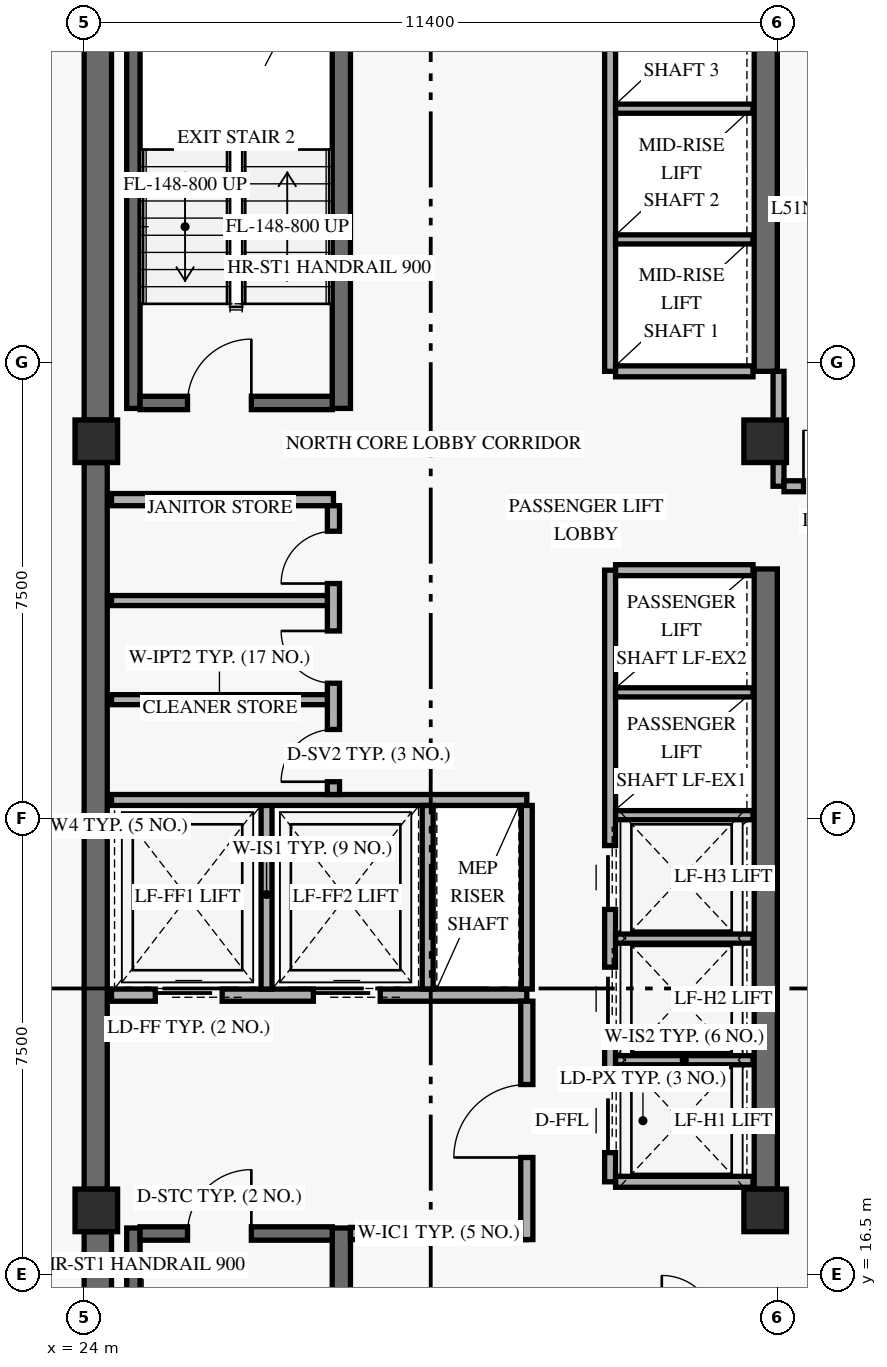
"""IFC4 building model, lengths in metres.
Left out: names, types, materials, properties, quantities, classifications, styles, units other than length and angle.
Written with IfcOpenShell. Run it as: python <this file> out.ifc"""

import sys

from ifc_helpers import new_model, si_unit, direction, frame, frame_2d, origin, origin_2d, place, context, subcontext, project, spatial, rectangle, extrude, element, fill, save


model = new_model("IFC4")
c1 = context("Model", 3, precision=1e-05, world=origin(), true_north=direction((0.0, 1.0)))
c2 = subcontext(c1, "Body", "Model", "MODEL_VIEW")
j1 = project(units=[si_unit("LENGTHUNIT", "METRE"), si_unit("PLANEANGLEUNIT", "RADIAN")], contexts=[c1])
p1 = place(None, origin())
s1 = spatial("IfcSite", under=j1, at=p1, CompositionType="ELEMENT")
p2 = place(p1, origin())
s2 = spatial("IfcBuilding", under=s1, at=p2, CompositionType="ELEMENT")
p3 = place(p2, frame((0.0, 0.0, 196.2)))
s3 = spatial("IfcBuildingStorey", under=s2, at=p3, CompositionType="ELEMENT", Elevation=196.2)
p4 = place(p3, frame((24.225, 9.6, 0.0), z_axis=(0.0, 0.0, 1.0), x_axis=(0.0, 1.0, 0.0)))
e1 = element("IfcWall", 1, at=p4, inside=s3, PredefinedType="SHEAR", context=c2, shape_type="SweptSolid", body=[
    extrude(rectangle(XDim=7.6, YDim=0.45, at=frame_2d((3.8, 0.0))), origin(), (0.0, 0.0, 1.0), 2.688),
])
p5 = place(p3, frame((24.19, 17.9, 0.0), z_axis=(0.0, 0.0, 1.0), x_axis=(0.0, 1.0, 0.0)))
e2 = element("IfcWall", 2, at=p5, inside=s3, PredefinedType="SHEAR", context=c2, shape_type="SweptSolid", body=[
    extrude(rectangle(XDim=11.95, YDim=0.38, at=frame_2d((5.975, 0.0))), origin(), (0.0, 0.0, 1.0), 2.688),
])
p6 = place(p3, frame((24.225, 30.55, 0.0), z_axis=(0.0, 0.0, 1.0), x_axis=(0.0, 1.0, 0.0)))
e3 = element("IfcWall", 3, at=p6, inside=s3, PredefinedType="SHEAR", context=c2, shape_type="SweptSolid", body=[
    extrude(rectangle(XDim=7.85, YDim=0.45, at=frame_2d((3.925, 0.0))), origin(), (0.0, 0.0, 1.0), 2.688),
])
p7 = place(p3, frame((35.21, 17.9, 0.0), z_axis=(0.0, 0.0, 1.0), x_axis=(0.0, 1.0, 0.0)))
e4 = element("IfcWall", 4, at=p7, inside=s3, PredefinedType="SHEAR", context=c2, shape_type="SweptSolid", body=[
    extrude(rectangle(XDim=10.2, YDim=0.38, at=frame_2d((5.1, 0.0))), origin(), (0.0, 0.0, 1.0), 2.688),
])
p8 = place(p3, frame((35.21, 31.35, 0.0), z_axis=(0.0, 0.0, 1.0), x_axis=(0.0, 1.0, 0.0)))
e5 = element("IfcWall", 5, at=p8, inside=s3, PredefinedType="SHEAR", context=c2, shape_type="SweptSolid", body=[
    extrude(rectangle(XDim=7.05, YDim=0.38, at=frame_2d((3.525, 0.0))), origin(), (0.0, 0.0, 1.0), 2.688),
])
p9 = place(p3, frame((24.81, 9.5, 0.0), z_axis=(0.0, 0.0, 1.0), x_axis=(0.0, 1.0, 0.0)))
e6 = element("IfcWall", 6, at=p9, inside=s3, PredefinedType="SHEAR", context=c2, shape_type="SweptSolid", body=[
    extrude(rectangle(XDim=7.76, YDim=0.22, at=frame_2d((3.88, 0.0))), origin(), (0.0, 0.0, 1.0), 3.3),
])
p10 = place(p3, frame((28.23, 9.5, 0.0), z_axis=(0.0, 0.0, 1.0), x_axis=(0.0, 1.0, 0.0)))
e7 = element("IfcWall", 7, at=p10, inside=s3, PredefinedType="SHEAR", context=c2, shape_type="SweptSolid", body=[
    extrude(rectangle(XDim=7.76, YDim=0.3, at=frame_2d((3.88, 0.0))), origin(), (0.0, 0.0, 1.0), 3.3),
])
p11 = place(p3, frame((24.92, 17.17, 0.0), z_axis=(0.0, 0.0, 1.0), x_axis=(1.0, 0.0, 0.0)))
e8 = element("IfcWall", 8, at=p11, inside=s3, PredefinedType="SHEAR", context=c2, shape_type="SweptSolid", body=[
    extrude(rectangle(XDim=3.16, YDim=0.22, at=frame_2d((1.58, 0.0))), origin(), (0.0, 0.0, 1.0), 3.3),
])
p12 = place(p11, frame((0.78, 0.0, 0.0)))
e9 = element("IfcOpeningElement", 9, at=p12, cuts=e8, PredefinedType="OPENING", context=c2, shape_type="SweptSolid", body=[
    extrude(rectangle(XDim=1.05, YDim=2.15, at=frame_2d((0.525, 1.075))), frame((0.0, 0.12, 0.0), z_axis=(0.0, -1.0, 0.0), x_axis=(1.0, 0.0, 0.0)), (0.0, 0.0, 1.0), 0.24),
])
p13 = place(p3, frame((24.81, 30.74, 0.0), z_axis=(0.0, 0.0, 1.0), x_axis=(0.0, 1.0, 0.0)))
e10 = element("IfcWall", 10, at=p13, inside=s3, PredefinedType="SHEAR", context=c2, shape_type="SweptSolid", body=[
    extrude(rectangle(XDim=7.76, YDim=0.22, at=frame_2d((3.88, 0.0))), origin(), (0.0, 0.0, 1.0), 3.3),
])
p14 = place(p3, frame((28.23, 30.74, 0.0), z_axis=(0.0, 0.0, 1.0), x_axis=(0.0, 1.0, 0.0)))
e11 = element("IfcWall", 11, at=p14, inside=s3, PredefinedType="SHEAR", context=c2, shape_type="SweptSolid", body=[
    extrude(rectangle(XDim=7.76, YDim=0.3, at=frame_2d((3.88, 0.0))), origin(), (0.0, 0.0, 1.0), 3.3),
])
p15 = place(p3, frame((24.92, 30.83, 0.0), z_axis=(0.0, 0.0, 1.0), x_axis=(1.0, 0.0, 0.0)))
e12 = element("IfcWall", 12, at=p15, inside=s3, PredefinedType="SHEAR", context=c2, shape_type="SweptSolid", body=[
    extrude(rectangle(XDim=3.16, YDim=0.22, at=frame_2d((1.58, 0.0))), origin(), (0.0, 0.0, 1.0), 3.3),
])
p16 = place(p15, frame((0.78, 0.0, 0.0)))
e13 = element("IfcOpeningElement", 13, at=p16, cuts=e12, PredefinedType="OPENING", context=c2, shape_type="SweptSolid", body=[
    extrude(rectangle(XDim=1.05, YDim=2.15, at=frame_2d((0.525, 1.075))), frame((0.0, 0.12, 0.0), z_axis=(0.0, -1.0, 0.0), x_axis=(1.0, 0.0, 0.0)), (0.0, 0.0, 1.0), 0.24),
])
for number, where, z_axis, x_axis in (
    (14, (24.2, 17.55, 0.0), (0.0, 0.0, 1.0), (1.0, 0.0, 0.0)),
    (15, (24.2, 30.2, 0.0), (0.0, 0.0, 1.0), (1.0, 0.0, 0.0)),
    (16, (35.2, 17.55, 0.0), (0.0, 0.0, 1.0), (1.0, 0.0, 0.0)),
    (17, (35.2, 30.2, 0.0), (0.0, 0.0, 1.0), (1.0, 0.0, 0.0)),
):
    element("IfcColumn", number, at=place(p3, frame(where, z_axis=z_axis, x_axis=x_axis)), inside=s3, PredefinedType="COLUMN", context=c2, shape_type="SweptSolid", body=[
        extrude(rectangle(XDim=0.7, YDim=0.7, at=origin_2d()), origin(), (0.0, 0.0, 1.0), 3.6),
    ])
p17 = place(p3, frame((24.45, 21.09, 0.0), z_axis=(0.0, 0.0, 1.0), x_axis=(1.0, 0.0, 0.0)))
e18 = element("IfcWall", 18, at=p17, inside=s3, PredefinedType="STANDARD", context=c2, shape_type="SweptSolid", body=[
    extrude(rectangle(XDim=6.83, YDim=0.2, at=frame_2d((3.415, 0.0))), origin(), (0.0, 0.0, 1.0), 3.3),
])
p18 = place(p17, frame((0.72, 0.0, 0.0)))
e19 = element("IfcOpeningElement", 19, at=p18, cuts=e18, PredefinedType="OPENING", context=c2, shape_type="SweptSolid", body=[
    extrude(rectangle(XDim=1.1, YDim=2.2, at=frame_2d((0.55, 1.1))), frame((0.0, 0.11, 0.0), z_axis=(0.0, -1.0, 0.0), x_axis=(1.0, 0.0, 0.0)), (0.0, 0.0, 1.0), 0.22),
])
p19 = place(p17, frame((3.32, 0.0, 0.0)))
e20 = element("IfcOpeningElement", 20, at=p19, cuts=e18, PredefinedType="OPENING", context=c2, shape_type="SweptSolid", body=[
    extrude(rectangle(XDim=1.1, YDim=2.2, at=frame_2d((0.55, 1.1))), frame((0.0, 0.11, 0.0), z_axis=(0.0, -1.0, 0.0), x_axis=(1.0, 0.0, 0.0)), (0.0, 0.0, 1.0), 0.22),
])
p20 = place(p3, frame((28.38, 17.17, 0.0), z_axis=(0.0, 0.0, 1.0), x_axis=(1.0, 0.0, 0.0)))
e21 = element("IfcWall", 21, at=p20, inside=s3, PredefinedType="STANDARD", context=c2, shape_type="SweptSolid", body=[
    extrude(rectangle(XDim=2.9, YDim=0.2, at=frame_2d((1.45, 0.0))), origin(), (0.0, 0.0, 1.0), 3.3),
])
p21 = place(p3, frame((31.28, 17.07, 0.0), z_axis=(0.0, 0.0, 1.0), x_axis=(0.0, 1.0, 0.0)))
e22 = element("IfcWall", 22, at=p21, inside=s3, PredefinedType="STANDARD", context=c2, shape_type="SweptSolid", body=[
    extrude(rectangle(XDim=3.92, YDim=0.2, at=frame_2d((1.96, 0.0))), origin(), (0.0, 0.0, 1.0), 2.67),
])
p22 = place(p21, frame((1.35, 0.0, 0.0)))
e23 = element("IfcOpeningElement", 23, at=p22, cuts=e22, PredefinedType="OPENING", context=c2, shape_type="SweptSolid", body=[
    extrude(rectangle(XDim=1.2, YDim=2.15, at=frame_2d((0.6, 1.075))), frame((0.0, 0.11, 0.0), z_axis=(0.0, -1.0, 0.0), x_axis=(1.0, 0.0, 0.0)), (0.0, 0.0, 1.0), 0.22),
])
p23 = place(p3, frame((27.0, 21.19, 0.0), z_axis=(0.0, 0.0, 1.0), x_axis=(0.0, 1.0, 0.0)))
e24 = element("IfcWall", 24, at=p23, inside=s3, PredefinedType="STANDARD", context=c2, shape_type="SweptSolid", body=[
    extrude(rectangle(XDim=3.11, YDim=0.18, at=frame_2d((1.555, 0.0))), origin(), (0.0, 0.0, 1.0), 3.3),
])
p24 = place(p3, frame((24.45, 24.3, 0.0), z_axis=(0.0, 0.0, 1.0), x_axis=(1.0, 0.0, 0.0)))
e25 = element("IfcWall", 25, at=p24, inside=s3, PredefinedType="STANDARD", context=c2, shape_type="SweptSolid", body=[
    extrude(rectangle(XDim=6.83, YDim=0.18, at=frame_2d((3.415, 0.0))), origin(), (0.0, 0.0, 1.0), 3.3),
])
for number, where, z_axis, x_axis in (
    (26, (29.65, 21.19, 0.0), (0.0, 0.0, 1.0), (0.0, 1.0, 0.0)),
    (27, (31.28, 21.19, 0.0), (0.0, 0.0, 1.0), (0.0, 1.0, 0.0)),
):
    element("IfcWall", number, at=place(p3, frame(where, z_axis=z_axis, x_axis=x_axis)), inside=s3, PredefinedType="STANDARD", context=c2, shape_type="SweptSolid", body=[
        extrude(rectangle(XDim=3.02, YDim=0.18, at=frame_2d((1.51, 0.0))), origin(), (0.0, 0.0, 1.0), 3.3),
    ])
p25 = place(p3, frame((24.45, 29.24, 0.0), z_axis=(0.0, 0.0, 1.0), x_axis=(1.0, 0.0, 0.0)))
e28 = element("IfcWall", 28, at=p25, inside=s3, PredefinedType="STANDARD", context=c2, shape_type="SweptSolid", body=[
    extrude(rectangle(XDim=3.65, YDim=0.2, at=frame_2d((1.825, 0.0))), origin(), (0.0, 0.0, 1.0), 3.3),
])
p26 = place(p3, frame((28.1, 24.39, 0.0), z_axis=(0.0, 0.0, 1.0), x_axis=(0.0, 1.0, 0.0)))
e29 = element("IfcWall", 29, at=p26, inside=s3, PredefinedType="STANDARD", context=c2, shape_type="SweptSolid", body=[
    extrude(rectangle(XDim=4.75, YDim=0.2, at=frame_2d((2.375, 0.0))), origin(), (0.0, 0.0, 1.0), 3.3),
])
p27 = place(p26, frame((0.21, 0.0, 0.0)))
e30 = element("IfcOpeningElement", 30, at=p27, cuts=e29, PredefinedType="OPENING", context=c2, shape_type="SweptSolid", body=[
    extrude(rectangle(XDim=0.86, YDim=2.1, at=frame_2d((0.43, 1.05))), frame((0.0, 0.11, 0.0), z_axis=(0.0, -1.0, 0.0), x_axis=(1.0, 0.0, 0.0)), (0.0, 0.0, 1.0), 0.22),
])
p28 = place(p26, frame((1.83, 0.0, 0.0)))
e31 = element("IfcOpeningElement", 31, at=p28, cuts=e29, PredefinedType="OPENING", context=c2, shape_type="SweptSolid", body=[
    extrude(rectangle(XDim=0.86, YDim=2.1, at=frame_2d((0.43, 1.05))), frame((0.0, 0.11, 0.0), z_axis=(0.0, -1.0, 0.0), x_axis=(1.0, 0.0, 0.0)), (0.0, 0.0, 1.0), 0.22),
])
p29 = place(p26, frame((3.47, 0.0, 0.0)))
e32 = element("IfcOpeningElement", 32, at=p29, cuts=e29, PredefinedType="OPENING", context=c2, shape_type="SweptSolid", body=[
    extrude(rectangle(XDim=0.86, YDim=2.1, at=frame_2d((0.43, 1.05))), frame((0.0, 0.11, 0.0), z_axis=(0.0, -1.0, 0.0), x_axis=(1.0, 0.0, 0.0)), (0.0, 0.0, 1.0), 0.22),
])
for number, where, z_axis, x_axis in (
    (33, (24.45, 25.95, 0.0), (0.0, 0.0, 1.0), (1.0, 0.0, 0.0)),
    (34, (24.45, 27.58, 0.0), (0.0, 0.0, 1.0), (1.0, 0.0, 0.0)),
):
    element("IfcWall", number, at=place(p3, frame(where, z_axis=z_axis, x_axis=x_axis)), inside=s3, PredefinedType="PARTITIONING", context=c2, shape_type="SweptSolid", body=[
        extrude(rectangle(XDim=3.55, YDim=0.165, at=frame_2d((1.775, 0.0))), origin(), (0.0, 0.0, 1.0), 3.3),
    ])
p30 = place(p3, frame((32.65, 18.02, 0.0), z_axis=(0.0, 0.0, 1.0), x_axis=(0.0, 1.0, 0.0)))
e35 = element("IfcWall", 35, at=p30, inside=s3, PredefinedType="STANDARD", context=c2, shape_type="SweptSolid", body=[
    extrude(rectangle(XDim=10.06, YDim=0.18, at=frame_2d((5.03, 0.0))), origin(), (0.0, 0.0, 1.0), 3.3),
])
p31 = place(p30, frame((0.48, 0.0, 0.0)))
e36 = element("IfcOpeningElement", 36, at=p31, cuts=e35, PredefinedType="OPENING", context=c2, shape_type="SweptSolid", body=[
    extrude(rectangle(XDim=1.05, YDim=2.2, at=frame_2d((0.525, 1.1))), frame((0.0, 0.1, 0.0), z_axis=(0.0, -1.0, 0.0), x_axis=(1.0, 0.0, 0.0)), (0.0, 0.0, 1.0), 0.2),
])
p32 = place(p30, frame((2.48, 0.0, 0.0)))
e37 = element("IfcOpeningElement", 37, at=p32, cuts=e35, PredefinedType="OPENING", context=c2, shape_type="SweptSolid", body=[
    extrude(rectangle(XDim=1.05, YDim=2.2, at=frame_2d((0.525, 1.1))), frame((0.0, 0.1, 0.0), z_axis=(0.0, -1.0, 0.0), x_axis=(1.0, 0.0, 0.0)), (0.0, 0.0, 1.0), 0.2),
])
p33 = place(p30, frame((4.48, 0.0, 0.0)))
e38 = element("IfcOpeningElement", 38, at=p33, cuts=e35, PredefinedType="OPENING", context=c2, shape_type="SweptSolid", body=[
    extrude(rectangle(XDim=1.05, YDim=2.2, at=frame_2d((0.525, 1.1))), frame((0.0, 0.1, 0.0), z_axis=(0.0, -1.0, 0.0), x_axis=(1.0, 0.0, 0.0)), (0.0, 0.0, 1.0), 0.2),
])
for number, where, z_axis, x_axis in (
    (39, (32.74, 18.02, 0.0), (0.0, 0.0, 1.0), (1.0, 0.0, 0.0)),
    (40, (32.74, 28.08, 0.0), (0.0, 0.0, 1.0), (1.0, 0.0, 0.0)),
):
    element("IfcWall", number, at=place(p3, frame(where, z_axis=z_axis, x_axis=x_axis)), inside=s3, PredefinedType="STANDARD", context=c2, shape_type="SweptSolid", body=[
        extrude(rectangle(XDim=2.26, YDim=0.18, at=frame_2d((1.13, 0.0))), origin(), (0.0, 0.0, 1.0), 3.3),
    ])
for number, where, z_axis, x_axis in (
    (41, (32.74, 20.02, 0.0), (0.0, 0.0, 1.0), (1.0, 0.0, 0.0)),
    (42, (32.74, 22.02, 0.0), (0.0, 0.0, 1.0), (1.0, 0.0, 0.0)),
    (43, (32.74, 24.05, 0.0), (0.0, 0.0, 1.0), (1.0, 0.0, 0.0)),
    (44, (32.74, 26.07, 0.0), (0.0, 0.0, 1.0), (1.0, 0.0, 0.0)),
):
    element("IfcWall", number, at=place(p3, frame(where, z_axis=z_axis, x_axis=x_axis)), inside=s3, PredefinedType="STANDARD", context=c2, shape_type="SweptSolid", body=[
        extrude(rectangle(XDim=2.26, YDim=0.15, at=frame_2d((1.13, 0.0))), origin(), (0.0, 0.0, 1.0), 3.3),
    ])
p34 = place(p3, frame((32.65, 31.35, 0.0), z_axis=(0.0, 0.0, 1.0), x_axis=(0.0, 1.0, 0.0)))
e45 = element("IfcWall", 45, at=p34, inside=s3, PredefinedType="STANDARD", context=c2, shape_type="SweptSolid", body=[
    extrude(rectangle(XDim=7.21, YDim=0.18, at=frame_2d((3.605, 0.0))), origin(), (0.0, 0.0, 1.0), 3.3),
])
p35 = place(p3, frame((32.74, 31.35, 0.0), z_axis=(0.0, 0.0, 1.0), x_axis=(1.0, 0.0, 0.0)))
e46 = element("IfcWall", 46, at=p35, inside=s3, PredefinedType="STANDARD", context=c2, shape_type="SweptSolid", body=[
    extrude(rectangle(XDim=2.26, YDim=0.18, at=frame_2d((1.13, 0.0))), origin(), (0.0, 0.0, 1.0), 3.3),
])
for number, where, z_axis, x_axis in (
    (47, (32.74, 33.52, 0.0), (0.0, 0.0, 1.0), (1.0, 0.0, 0.0)),
    (48, (32.74, 35.67, 0.0), (0.0, 0.0, 1.0), (1.0, 0.0, 0.0)),
):
    element("IfcWall", number, at=place(p3, frame(where, z_axis=z_axis, x_axis=x_axis)), inside=s3, PredefinedType="STANDARD", context=c2, shape_type="SweptSolid", body=[
        extrude(rectangle(XDim=2.26, YDim=0.15, at=frame_2d((1.13, 0.0))), origin(), (0.0, 0.0, 1.0), 3.3),
    ])
p36 = place(p3, frame((35.42, 29.46, 0.0), z_axis=(0.0, 0.0, 1.0), x_axis=(0.0, 1.0, 0.0)))
e49 = element("IfcWall", 49, at=p36, inside=s3, PredefinedType="STANDARD", context=c2, shape_type="SweptSolid", body=[
    extrude(rectangle(XDim=1.89, YDim=0.18, at=frame_2d((0.945, 0.0))), origin(), (0.0, 0.0, 1.0), 2.67),
])
p37 = place(p3, frame((35.51, 29.46, 0.0), z_axis=(0.0, 0.0, 1.0), x_axis=(1.0, 0.0, 0.0)))
e50 = element("IfcWall", 50, at=p37, inside=s3, PredefinedType="STANDARD", context=c2, shape_type="SweptSolid", body=[
    extrude(rectangle(XDim=13.69, YDim=0.18, at=frame_2d((6.845, 0.0))), origin(), (0.0, 0.0, 1.0), 2.67),
])
p38 = place(p37, frame((0.32, 0.0, 0.0)))
e51 = element("IfcOpeningElement", 51, at=p38, cuts=e50, PredefinedType="OPENING", context=c2, shape_type="SweptSolid", body=[
    extrude(rectangle(XDim=0.92, YDim=2.15, at=frame_2d((0.46, 1.075))), frame((0.0, 0.1, 0.0), z_axis=(0.0, -1.0, 0.0), x_axis=(1.0, 0.0, 0.0)), (0.0, 0.0, 1.0), 0.2),
])
p39 = place(p12, frame((1.05, 0.0, 0.0), z_axis=(0.0, 0.0, 1.0), x_axis=(-1.0, 0.0, 0.0)))
e52 = element("IfcDoor", 52, at=p39, inside=s3, OperationType="SINGLE_SWING_LEFT", PredefinedType="DOOR", context=c2, shape_type="SweptSolid", body=[
    extrude(rectangle(XDim=1.05, YDim=2.15, at=frame_2d((0.525, 1.075))), frame((0.0, 0.025, 0.0), z_axis=(0.0, -1.0, 0.0), x_axis=(1.0, 0.0, 0.0)), (0.0, 0.0, 1.0), 0.05),
])
fill(e9, e52)
p40 = place(p16, origin())
e53 = element("IfcDoor", 53, at=p40, inside=s3, OperationType="SINGLE_SWING_RIGHT", PredefinedType="DOOR", context=c2, shape_type="SweptSolid", body=[
    extrude(rectangle(XDim=1.05, YDim=2.15, at=frame_2d((0.525, 1.075))), frame((0.0, 0.025, 0.0), z_axis=(0.0, -1.0, 0.0), x_axis=(1.0, 0.0, 0.0)), (0.0, 0.0, 1.0), 0.05),
])
fill(e13, e53)
p41 = place(p18, origin())
e54 = element("IfcDoor", 54, at=p41, inside=s3, OperationType="SLIDING_TO_LEFT", PredefinedType="DOOR", context=c2, shape_type="SweptSolid", body=[
    extrude(rectangle(XDim=1.1, YDim=2.2, at=frame_2d((0.55, 1.1))), frame((0.0, 0.025, 0.0), z_axis=(0.0, -1.0, 0.0), x_axis=(1.0, 0.0, 0.0)), (0.0, 0.0, 1.0), 0.05),
])
fill(e19, e54)
p42 = place(p19, origin())
e55 = element("IfcDoor", 55, at=p42, inside=s3, OperationType="SLIDING_TO_LEFT", PredefinedType="DOOR", context=c2, shape_type="SweptSolid", body=[
    extrude(rectangle(XDim=1.1, YDim=2.2, at=frame_2d((0.55, 1.1))), frame((0.0, 0.025, 0.0), z_axis=(0.0, -1.0, 0.0), x_axis=(1.0, 0.0, 0.0)), (0.0, 0.0, 1.0), 0.05),
])
fill(e20, e55)
p43 = place(p22, origin())
e56 = element("IfcDoor", 56, at=p43, inside=s3, OperationType="SINGLE_SWING_LEFT", PredefinedType="DOOR", context=c2, shape_type="SweptSolid", body=[
    extrude(rectangle(XDim=1.2, YDim=2.15, at=frame_2d((0.6, 1.075))), frame((0.0, 0.025, 0.0), z_axis=(0.0, -1.0, 0.0), x_axis=(1.0, 0.0, 0.0)), (0.0, 0.0, 1.0), 0.05),
])
fill(e23, e56)
p44 = place(p27, origin())
e57 = element("IfcDoor", 57, at=p44, inside=s3, OperationType="SINGLE_SWING_LEFT", PredefinedType="DOOR", context=c2, shape_type="SweptSolid", body=[
    extrude(rectangle(XDim=0.86, YDim=2.1, at=frame_2d((0.43, 1.05))), frame((0.0, 0.025, 0.0), z_axis=(0.0, -1.0, 0.0), x_axis=(1.0, 0.0, 0.0)), (0.0, 0.0, 1.0), 0.05),
])
fill(e30, e57)
p45 = place(p28, origin())
e58 = element("IfcDoor", 58, at=p45, inside=s3, OperationType="SINGLE_SWING_RIGHT", PredefinedType="DOOR", context=c2, shape_type="SweptSolid", body=[
    extrude(rectangle(XDim=0.86, YDim=2.1, at=frame_2d((0.43, 1.05))), frame((0.0, 0.025, 0.0), z_axis=(0.0, -1.0, 0.0), x_axis=(1.0, 0.0, 0.0)), (0.0, 0.0, 1.0), 0.05),
])
fill(e31, e58)
p46 = place(p29, origin())
e59 = element("IfcDoor", 59, at=p46, inside=s3, OperationType="SINGLE_SWING_LEFT", PredefinedType="DOOR", context=c2, shape_type="SweptSolid", body=[
    extrude(rectangle(XDim=0.86, YDim=2.1, at=frame_2d((0.43, 1.05))), frame((0.0, 0.025, 0.0), z_axis=(0.0, -1.0, 0.0), x_axis=(1.0, 0.0, 0.0)), (0.0, 0.0, 1.0), 0.05),
])
fill(e32, e59)
p47 = place(p31, origin())
e60 = element("IfcDoor", 60, at=p47, inside=s3, OperationType="SLIDING_TO_LEFT", PredefinedType="DOOR", context=c2, shape_type="SweptSolid", body=[
    extrude(rectangle(XDim=1.05, YDim=2.2, at=frame_2d((0.525, 1.1))), frame((0.0, 0.025, 0.0), z_axis=(0.0, -1.0, 0.0), x_axis=(1.0, 0.0, 0.0)), (0.0, 0.0, 1.0), 0.05),
])
fill(e36, e60)
p48 = place(p32, origin())
e61 = element("IfcDoor", 61, at=p48, inside=s3, OperationType="SLIDING_TO_LEFT", PredefinedType="DOOR", context=c2, shape_type="SweptSolid", body=[
    extrude(rectangle(XDim=1.05, YDim=2.2, at=frame_2d((0.525, 1.1))), frame((0.0, 0.025, 0.0), z_axis=(0.0, -1.0, 0.0), x_axis=(1.0, 0.0, 0.0)), (0.0, 0.0, 1.0), 0.05),
])
fill(e37, e61)
p49 = place(p33, origin())
e62 = element("IfcDoor", 62, at=p49, inside=s3, OperationType="SLIDING_TO_LEFT", PredefinedType="DOOR", context=c2, shape_type="SweptSolid", body=[
    extrude(rectangle(XDim=1.05, YDim=2.2, at=frame_2d((0.525, 1.1))), frame((0.0, 0.025, 0.0), z_axis=(0.0, -1.0, 0.0), x_axis=(1.0, 0.0, 0.0)), (0.0, 0.0, 1.0), 0.05),
])
fill(e38, e62)
p50 = place(p38, origin())
e63 = element("IfcDoor", 63, at=p50, inside=s3, OperationType="SINGLE_SWING_LEFT", PredefinedType="DOOR", context=c2, shape_type="SweptSolid", body=[
    extrude(rectangle(XDim=0.92, YDim=2.15, at=frame_2d((0.46, 1.075))), frame((0.0, 0.025, 0.0), z_axis=(0.0, -1.0, 0.0), x_axis=(1.0, 0.0, 0.0)), (0.0, 0.0, 1.0), 0.05),
])
fill(e51, e63)
save(model, sys.argv[1])
